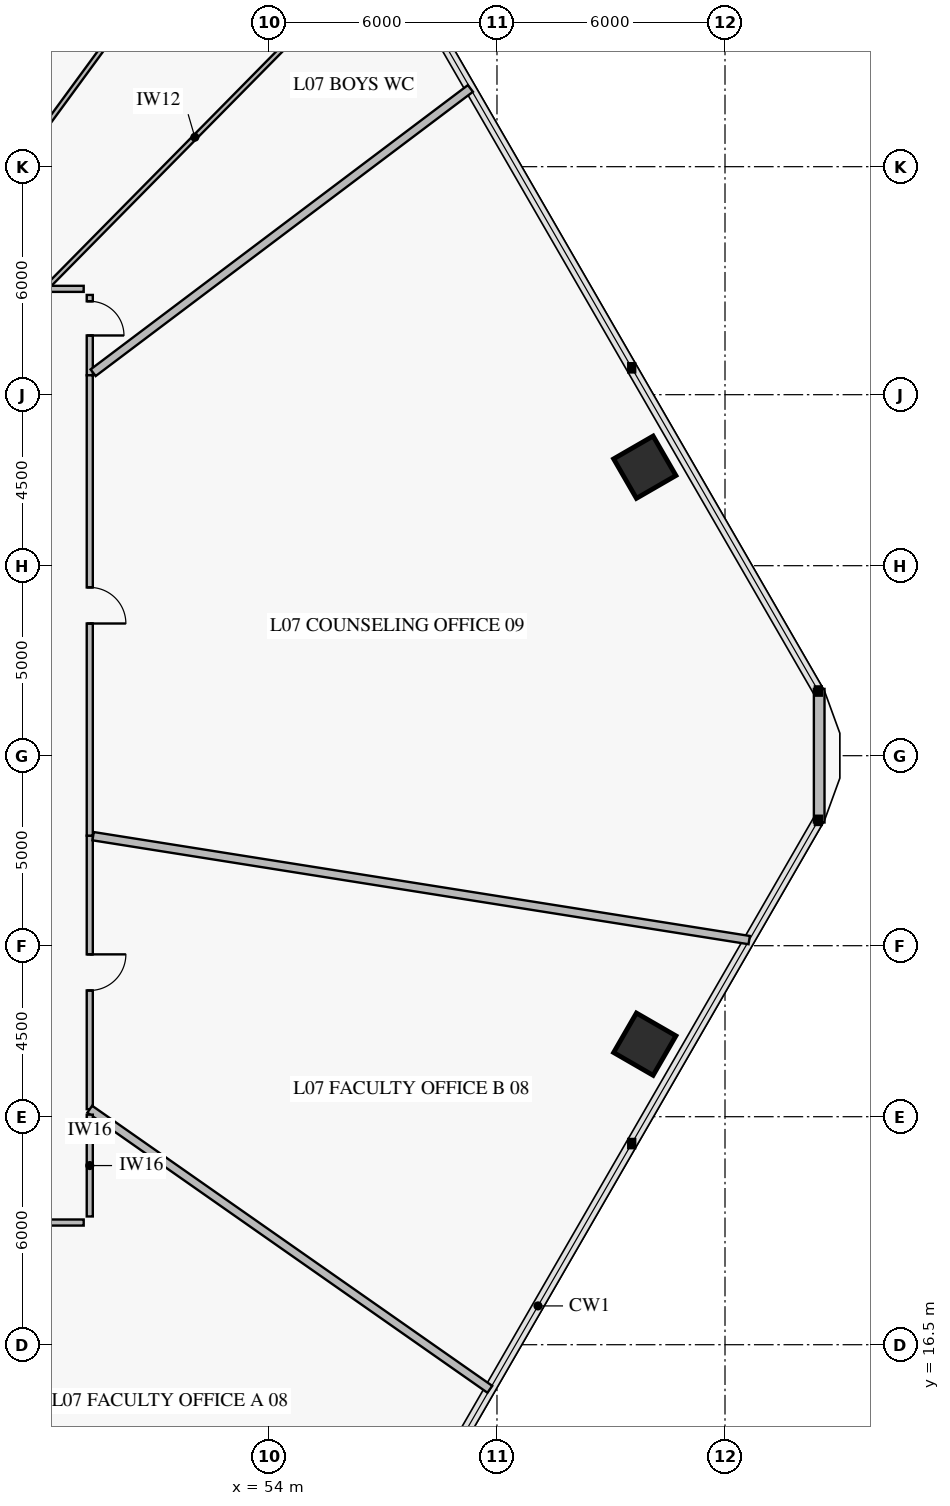
"""IFC4 building model, lengths in metres.
Left out: names, types, materials, properties, quantities, classifications, styles, units other than length and angle.
Written with IfcOpenShell. Run it as: python <this file> out.ifc"""

import sys

from ifc_helpers import new_model, si_unit, direction, frame, frame_2d, origin, origin_2d, place, context, subcontext, project, spatial, rectangle, extrude, element, fill, save


model = new_model("IFC4")
c1 = context("Model", 3, precision=1e-05, world=origin(), true_north=direction((0.0, 1.0)))
c2 = subcontext(c1, "Body", "Model", "MODEL_VIEW")
j1 = project(units=[si_unit("LENGTHUNIT", "METRE"), si_unit("PLANEANGLEUNIT", "RADIAN")], contexts=[c1])
p1 = place(None, origin())
s1 = spatial("IfcSite", under=j1, at=p1, CompositionType="ELEMENT")
p2 = place(p1, origin())
s2 = spatial("IfcBuilding", under=s1, at=p2, CompositionType="ELEMENT")
p3 = place(p2, frame((0.0, 0.0, 28.8)))
s3 = spatial("IfcBuildingStorey", under=s2, at=p3, CompositionType="ELEMENT", Elevation=28.8)
for number, where, z_axis, x_axis in (
    (1, (63.889, 39.592, 0.0), (0.0, 0.0, 1.0), (-0.5, 0.866, 0.0)),
    (2, (63.889, 24.408, 0.0), (0.0, 0.0, 1.0), (0.5, 0.866, 0.0)),
):
    element("IfcColumn", number, at=place(p3, frame(where, z_axis=z_axis, x_axis=x_axis)), inside=s3, PredefinedType="COLUMN", context=c2, shape_type="SweptSolid", body=[
        extrude(rectangle(XDim=1.2, YDim=1.2, at=origin_2d()), origin(), (0.0, 0.0, 1.0), 3.92),
    ])
p4 = place(p3, frame((68.479, 33.758, 0.0), z_axis=(0.0, 0.0, 1.0), x_axis=(0.0, -1.0, 0.0)))
e3 = element("IfcWall", 3, at=p4, inside=s3, PredefinedType="SOLIDWALL", context=c2, shape_type="SweptSolid", body=[
    extrude(rectangle(XDim=3.515, YDim=0.28, at=frame_2d((1.758, 0.0))), origin(), (0.0, 0.0, 1.0), 3.92),
])
p5 = place(p3, frame((49.285, 42.011, 0.0), z_axis=(0.0, 0.0, 1.0), x_axis=(0.0, 1.0, 0.0)))
e4 = element("IfcWall", 4, at=p5, inside=s3, PredefinedType="PARTITIONING", context=c2, shape_type="SweptSolid", body=[
    extrude(rectangle(XDim=2.114, YDim=0.16, at=frame_2d((1.057, 0.0))), origin(), (0.0, 0.0, 1.0), 3.92),
])
p6 = place(p5, frame((1.047, 0.0, 0.0)))
e5 = element("IfcOpeningElement", 5, at=p6, cuts=e4, PredefinedType="OPENING", context=c2, shape_type="SweptSolid", body=[
    extrude(rectangle(XDim=0.9, YDim=2.1, at=frame_2d((0.45, 1.05))), frame((0.0, 0.092, 0.0), z_axis=(0.0, -1.0, 0.0), x_axis=(1.0, 0.0, 0.0)), (0.0, 0.0, 1.0), 0.184),
])
p7 = place(p3, frame((42.81, 19.715, 0.0), z_axis=(0.0, 0.0, 1.0), x_axis=(1.0, 0.0, 0.0)))
e6 = element("IfcWall", 6, at=p7, inside=s3, PredefinedType="PARTITIONING", context=c2, shape_type="SweptSolid", body=[
    extrude(rectangle(XDim=6.315, YDim=0.16, at=frame_2d((3.158, 0.0))), origin(), (0.0, 0.0, 1.0), 3.22),
])
p8 = place(p7, frame((2.683, 0.0, 0.0)))
e7 = element("IfcOpeningElement", 7, at=p8, cuts=e6, PredefinedType="OPENING", context=c2, shape_type="SweptSolid", body=[
    extrude(rectangle(XDim=0.95, YDim=2.1, at=frame_2d((0.475, 1.05))), frame((0.0, 0.092, 0.0), z_axis=(0.0, -1.0, 0.0), x_axis=(1.0, 0.0, 0.0)), (0.0, 0.0, 1.0), 0.184),
])
p9 = place(p3, frame((49.285, 22.698, 0.0), z_axis=(0.0, 0.0, 1.0), x_axis=(0.0, 1.0, 0.0)))
e8 = element("IfcWall", 8, at=p9, inside=s3, PredefinedType="PARTITIONING", context=c2, shape_type="SweptSolid", body=[
    extrude(rectangle(XDim=7.198, YDim=0.16, at=frame_2d((3.599, 0.0))), origin(), (0.0, 0.0, 1.0), 3.22),
])
p10 = place(p9, frame((3.124, 0.0, 0.0)))
e9 = element("IfcOpeningElement", 9, at=p10, cuts=e8, PredefinedType="OPENING", context=c2, shape_type="SweptSolid", body=[
    extrude(rectangle(XDim=0.95, YDim=2.1, at=frame_2d((0.475, 1.05))), frame((0.0, 0.092, 0.0), z_axis=(0.0, -1.0, 0.0), x_axis=(1.0, 0.0, 0.0)), (0.0, 0.0, 1.0), 0.184),
])
p11 = place(p3, frame((49.285, 29.896, 0.0), z_axis=(0.0, 0.0, 1.0), x_axis=(0.0, 1.0, 0.0)))
e10 = element("IfcWall", 10, at=p11, inside=s3, PredefinedType="PARTITIONING", context=c2, shape_type="SweptSolid", body=[
    extrude(rectangle(XDim=12.115, YDim=0.16, at=frame_2d((6.058, 0.0))), origin(), (0.0, 0.0, 1.0), 3.22),
])
p12 = place(p11, frame((5.583, 0.0, 0.0)))
e11 = element("IfcOpeningElement", 11, at=p12, cuts=e10, PredefinedType="OPENING", context=c2, shape_type="SweptSolid", body=[
    extrude(rectangle(XDim=0.95, YDim=2.1, at=frame_2d((0.475, 1.05))), frame((0.0, 0.092, 0.0), z_axis=(0.0, -1.0, 0.0), x_axis=(1.0, 0.0, 0.0)), (0.0, 0.0, 1.0), 0.184),
])
p13 = place(p3, frame((49.373, 42.077, 0.0), z_axis=(0.0, 0.0, 1.0), x_axis=(0.798630996951, 0.601821012187, 0.0)))
e12 = element("IfcWall", 12, at=p13, inside=s3, PredefinedType="PARTITIONING", context=c2, shape_type="SweptSolid", body=[
    extrude(rectangle(XDim=12.431, YDim=0.22, at=frame_2d((6.215, 0.0))), origin(), (0.0, 0.0, 1.0), 3.17),
])
p14 = place(p3, frame((49.125, 44.285, 0.0), z_axis=(0.0, 0.0, 1.0), x_axis=(-1.0, 0.0, 0.0)))
e13 = element("IfcWall", 13, at=p14, inside=s3, PredefinedType="PARTITIONING", context=c2, shape_type="SweptSolid", body=[
    extrude(rectangle(XDim=1.01, YDim=0.16, at=frame_2d((0.505, 0.0))), origin(), (0.0, 0.0, 1.0), 3.22),
])
p15 = place(p3, frame((48.201, 44.373, 0.0), z_axis=(0.0, 0.0, 1.0), x_axis=(0.702156728527, 0.712022421405, 0.0)))
e14 = element("IfcWall", 14, at=p15, inside=s3, PredefinedType="PARTITIONING", context=c2, shape_type="SweptSolid", body=[
    extrude(rectangle(XDim=10.963, YDim=0.12, at=frame_2d((5.481, 0.0))), origin(), (0.0, 0.0, 1.0), 3.22),
])
p16 = place(p3, frame((48.071, 48.493, 0.0), z_axis=(0.0, 0.0, 1.0), x_axis=(0.590600620108, 0.80696400634, 0.0)))
e15 = element("IfcWall", 15, at=p16, inside=s3, PredefinedType="PARTITIONING", context=c2, shape_type="SweptSolid", body=[
    extrude(rectangle(XDim=11.212, YDim=0.12, at=frame_2d((5.606, 0.0))), origin(), (0.0, 0.0, 1.0), 3.17),
])
p17 = place(p3, frame((45.142, 48.493, 0.0), z_axis=(0.0, 0.0, 1.0), x_axis=(0.484815156974, 0.874616638058, 0.0)))
e16 = element("IfcWall", 16, at=p17, inside=s3, PredefinedType="PARTITIONING", context=c2, shape_type="SweptSolid", body=[
    extrude(rectangle(XDim=14.027, YDim=0.22, at=frame_2d((7.014, 0.0))), origin(), (0.0, 0.0, 1.0), 3.17),
])
p18 = place(p3, frame((42.858, 19.627, 0.0), z_axis=(0.0, 0.0, 1.0), x_axis=(0.484814111505, -0.874617217579, 0.0)))
e17 = element("IfcWall", 17, at=p18, inside=s3, PredefinedType="PARTITIONING", context=c2, shape_type="SweptSolid", body=[
    extrude(rectangle(XDim=18.738, YDim=0.22, at=frame_2d((9.369, 0.0))), origin(), (0.0, 0.0, 1.0), 3.17),
])
p19 = place(p3, frame((49.285, 22.698, 0.0), z_axis=(0.0, 0.0, 1.0), x_axis=(0.819154265409, -0.57357326425, 0.0)))
e18 = element("IfcWall", 18, at=p19, inside=s3, PredefinedType="PARTITIONING", context=c2, shape_type="SweptSolid", body=[
    extrude(rectangle(XDim=12.851, YDim=0.22, at=frame_2d((6.426, 0.0))), origin(), (0.0, 0.0, 1.0), 3.17),
])
p20 = place(p3, frame((49.285, 19.875, 0.0), z_axis=(0.0, 0.0, 1.0), x_axis=(0.0, 1.0, 0.0)))
e19 = element("IfcWall", 19, at=p20, inside=s3, PredefinedType="PARTITIONING", context=c2, shape_type="SweptSolid", body=[
    extrude(rectangle(XDim=2.679, YDim=0.16, at=frame_2d((1.339, 0.0))), origin(), (0.0, 0.0, 1.0), 3.92),
])
p21 = place(p3, frame((49.373, 29.882, 0.0), z_axis=(0.0, 0.0, 1.0), x_axis=(0.987689809262, -0.156425191961, 0.0)))
e20 = element("IfcWall", 20, at=p21, inside=s3, PredefinedType="PARTITIONING", context=c2, shape_type="SweptSolid", body=[
    extrude(rectangle(XDim=17.479, YDim=0.22, at=frame_2d((8.739, 0.0))), origin(), (0.0, 0.0, 1.0), 3.17),
])
p22 = place(p6, frame((0.9, 0.0, 0.0), z_axis=(0.0, 0.0, 1.0), x_axis=(-1.0, 0.0, 0.0)))
e21 = element("IfcDoor", 21, at=p22, inside=s3, OperationType="SINGLE_SWING_RIGHT", PredefinedType="DOOR", context=c2, shape_type="SweptSolid", body=[
    extrude(rectangle(XDim=0.9, YDim=2.1, at=frame_2d((0.45, 1.05))), frame((0.0, 0.025, 0.0), z_axis=(0.0, -1.0, 0.0), x_axis=(1.0, 0.0, 0.0)), (0.0, 0.0, 1.0), 0.05),
])
fill(e5, e21)
p23 = place(p10, frame((0.95, 0.0, 0.0), z_axis=(0.0, 0.0, 1.0), x_axis=(-1.0, 0.0, 0.0)))
e22 = element("IfcDoor", 22, at=p23, inside=s3, OperationType="SINGLE_SWING_LEFT", PredefinedType="DOOR", context=c2, shape_type="SweptSolid", body=[
    extrude(rectangle(XDim=0.95, YDim=2.1, at=frame_2d((0.475, 1.05))), frame((0.0, 0.025, 0.0), z_axis=(0.0, -1.0, 0.0), x_axis=(1.0, 0.0, 0.0)), (0.0, 0.0, 1.0), 0.05),
])
fill(e9, e22)
p24 = place(p12, frame((0.95, 0.0, 0.0), z_axis=(0.0, 0.0, 1.0), x_axis=(-1.0, 0.0, 0.0)))
e23 = element("IfcDoor", 23, at=p24, inside=s3, OperationType="SINGLE_SWING_RIGHT", PredefinedType="DOOR", context=c2, shape_type="SweptSolid", body=[
    extrude(rectangle(XDim=0.95, YDim=2.1, at=frame_2d((0.475, 1.05))), frame((0.0, 0.025, 0.0), z_axis=(0.0, -1.0, 0.0), x_axis=(1.0, 0.0, 0.0)), (0.0, 0.0, 1.0), 0.05),
])
fill(e11, e23)
save(model, sys.argv[1])
